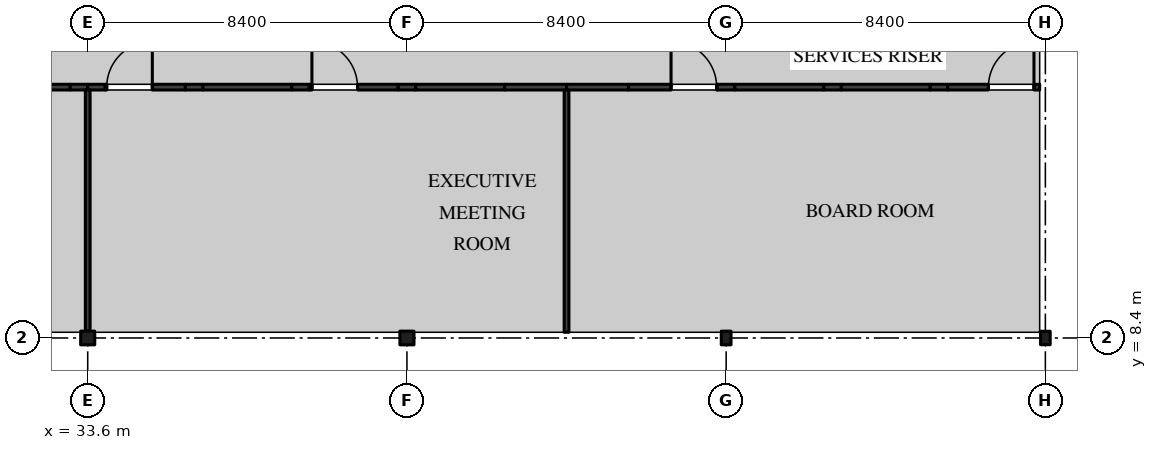
"""IFC4 building model, lengths in metres.
Left out: names, types, materials, properties, quantities, classifications, styles, units other than length and angle.
Written with IfcOpenShell. Run it as: python <this file> out.ifc"""

import sys

from ifc_helpers import new_model, si_unit, direction, frame, frame_2d, origin, origin_2d, place, context, subcontext, project, spatial, rectangle, i_section, extrude, element, fill, save


model = new_model("IFC4")
c1 = context("Model", 3, precision=1e-05, world=origin(), true_north=direction((0.0, 1.0)))
c2 = subcontext(c1, "Body", "Model", "MODEL_VIEW")
j1 = project(units=[si_unit("LENGTHUNIT", "METRE"), si_unit("PLANEANGLEUNIT", "RADIAN")], contexts=[c1])
p1 = place(None, origin())
s1 = spatial("IfcSite", under=j1, at=p1, CompositionType="ELEMENT")
p2 = place(p1, origin())
s2 = spatial("IfcBuilding", under=s1, at=p2, CompositionType="ELEMENT")
p3 = place(p2, frame((0.0, 0.0, 9.9)))
s3 = spatial("IfcBuildingStorey", under=s2, at=p3, CompositionType="ELEMENT", Elevation=9.9)
for number, where, z_axis, x_axis in (
    (1, (33.6, 8.4, 0.0), (0.0, 0.0, 1.0), (1.0, 0.0, 0.0)),
    (2, (42.0, 8.4, 0.0), (0.0, 0.0, 1.0), (1.0, 0.0, 0.0)),
):
    element("IfcColumn", number, at=place(p3, frame(where, z_axis=z_axis, x_axis=x_axis)), inside=s3, PredefinedType="COLUMN", context=c2, shape_type="SweptSolid", body=[
        extrude(i_section(OverallWidth=0.371, OverallDepth=0.361, WebThickness=0.012, FlangeThickness=0.02, FilletRadius=0.015, at=origin_2d()), origin(), (0.0, 0.0, 1.0), 4.37),
    ])
p4 = place(p3, frame((50.4, 8.4, 0.0), z_axis=(0.0, 0.0, 1.0), x_axis=(1.0, 0.0, 0.0)))
e3 = element("IfcColumn", 3, at=p4, inside=s3, PredefinedType="COLUMN", context=c2, shape_type="SweptSolid", body=[
    extrude(i_section(OverallWidth=0.257, OverallDepth=0.361, WebThickness=0.011, FlangeThickness=0.02, FilletRadius=0.015, at=origin_2d()), origin(), (0.0, 0.0, 1.0), 4.37),
])
p5 = place(p3, frame((58.8, 8.4, 0.0), z_axis=(0.0, 0.0, 1.0), x_axis=(1.0, 0.0, 0.0)))
e4 = element("IfcColumn", 4, at=p5, inside=s3, PredefinedType="COLUMN", context=c2, shape_type="SweptSolid", body=[
    extrude(i_section(OverallWidth=0.254, OverallDepth=0.353, WebThickness=0.01, FlangeThickness=0.016, FilletRadius=0.015, at=origin_2d()), origin(), (0.0, 0.0, 1.0), 4.37),
])
p6 = place(p3, frame((31.03, 15.0, 0.0), z_axis=(0.0, 0.0, 1.0), x_axis=(1.0, 0.0, 0.0)))
e5 = element("IfcWall", 5, at=p6, inside=s3, PredefinedType="PARTITIONING", context=c2, shape_type="SweptSolid", body=[
    extrude(rectangle(XDim=2.11, YDim=0.15, at=frame_2d((1.055, 0.0))), origin(), (0.0, 0.0, 1.0), 4.37),
])
p7 = place(p3, frame((33.14, 15.0, 0.0), z_axis=(0.0, 0.0, 1.0), x_axis=(1.0, 0.0, 0.0)))
e6 = element("IfcWall", 6, at=p7, inside=s3, PredefinedType="PARTITIONING", context=c2, shape_type="SweptSolid", body=[
    extrude(rectangle(XDim=0.46, YDim=0.15, at=frame_2d((0.23, 0.0))), origin(), (0.0, 0.0, 1.0), 3.746),
])
p8 = place(p3, frame((33.6, 15.0, 0.0), z_axis=(0.0, 0.0, 1.0), x_axis=(1.0, 0.0, 0.0)))
e7 = element("IfcWall", 7, at=p8, inside=s3, PredefinedType="PARTITIONING", context=c2, shape_type="SweptSolid", body=[
    extrude(rectangle(XDim=0.46, YDim=0.15, at=frame_2d((0.23, 0.0))), origin(), (0.0, 0.0, 1.0), 3.746),
])
p9 = place(p3, frame((34.06, 15.0, 0.0), z_axis=(0.0, 0.0, 1.0), x_axis=(1.0, 0.0, 0.0)))
e8 = element("IfcWall", 8, at=p9, inside=s3, PredefinedType="PARTITIONING", context=c2, shape_type="SweptSolid", body=[
    extrude(rectangle(XDim=2.11, YDim=0.15, at=frame_2d((1.055, 0.0))), origin(), (0.0, 0.0, 1.0), 4.37),
])
p10 = place(p9, frame((0.04, 0.0, 0.0)))
e9 = element("IfcOpeningElement", 9, at=p10, cuts=e8, PredefinedType="OPENING", context=c2, shape_type="SweptSolid", body=[
    extrude(rectangle(XDim=1.2, YDim=2.4, at=frame_2d((0.6, 1.2))), frame((0.0, 0.085, 0.0), z_axis=(0.0, -1.0, 0.0), x_axis=(1.0, 0.0, 0.0)), (0.0, 0.0, 1.0), 0.17),
])
p11 = place(p3, frame((36.17, 15.0, 0.0), z_axis=(0.0, 0.0, 1.0), x_axis=(1.0, 0.0, 0.0)))
e10 = element("IfcWall", 10, at=p11, inside=s3, PredefinedType="PARTITIONING", context=c2, shape_type="SweptSolid", body=[
    extrude(rectangle(XDim=0.46, YDim=0.15, at=frame_2d((0.23, 0.0))), origin(), (0.0, 0.0, 1.0), 3.895),
])
p12 = place(p3, frame((36.63, 15.0, 0.0), z_axis=(0.0, 0.0, 1.0), x_axis=(1.0, 0.0, 0.0)))
e11 = element("IfcWall", 11, at=p12, inside=s3, PredefinedType="PARTITIONING", context=c2, shape_type="SweptSolid", body=[
    extrude(rectangle(XDim=2.34, YDim=0.15, at=frame_2d((1.17, 0.0))), origin(), (0.0, 0.0, 1.0), 4.37),
])
p13 = place(p3, frame((38.97, 15.0, 0.0), z_axis=(0.0, 0.0, 1.0), x_axis=(1.0, 0.0, 0.0)))
e12 = element("IfcWall", 12, at=p13, inside=s3, PredefinedType="PARTITIONING", context=c2, shape_type="SweptSolid", body=[
    extrude(rectangle(XDim=0.46, YDim=0.15, at=frame_2d((0.23, 0.0))), origin(), (0.0, 0.0, 1.0), 3.895),
])
p14 = place(p3, frame((39.43, 15.0, 0.0), z_axis=(0.0, 0.0, 1.0), x_axis=(1.0, 0.0, 0.0)))
e13 = element("IfcWall", 13, at=p14, inside=s3, PredefinedType="PARTITIONING", context=c2, shape_type="SweptSolid", body=[
    extrude(rectangle(XDim=2.34, YDim=0.15, at=frame_2d((1.17, 0.0))), origin(), (0.0, 0.0, 1.0), 4.37),
])
p15 = place(p14, frame((0.07, 0.0, 0.0)))
e14 = element("IfcOpeningElement", 14, at=p15, cuts=e13, PredefinedType="OPENING", context=c2, shape_type="SweptSolid", body=[
    extrude(rectangle(XDim=1.2, YDim=2.4, at=frame_2d((0.6, 1.2))), frame((0.0, 0.085, 0.0), z_axis=(0.0, -1.0, 0.0), x_axis=(1.0, 0.0, 0.0)), (0.0, 0.0, 1.0), 0.17),
])
p16 = place(p3, frame((41.77, 15.0, 0.0), z_axis=(0.0, 0.0, 1.0), x_axis=(1.0, 0.0, 0.0)))
e15 = element("IfcWall", 15, at=p16, inside=s3, PredefinedType="PARTITIONING", context=c2, shape_type="SweptSolid", body=[
    extrude(rectangle(XDim=0.46, YDim=0.15, at=frame_2d((0.23, 0.0))), origin(), (0.0, 0.0, 1.0), 3.746),
])
p17 = place(p3, frame((42.23, 15.0, 0.0), z_axis=(0.0, 0.0, 1.0), x_axis=(1.0, 0.0, 0.0)))
e16 = element("IfcWall", 16, at=p17, inside=s3, PredefinedType="PARTITIONING", context=c2, shape_type="SweptSolid", body=[
    extrude(rectangle(XDim=2.34, YDim=0.15, at=frame_2d((1.17, 0.0))), origin(), (0.0, 0.0, 1.0), 4.37),
])
p18 = place(p3, frame((44.57, 15.0, 0.0), z_axis=(0.0, 0.0, 1.0), x_axis=(1.0, 0.0, 0.0)))
e17 = element("IfcWall", 17, at=p18, inside=s3, PredefinedType="PARTITIONING", context=c2, shape_type="SweptSolid", body=[
    extrude(rectangle(XDim=1.63, YDim=0.15, at=frame_2d((0.815, 0.0))), origin(), (0.0, 0.0, 1.0), 3.895),
])
p19 = place(p3, frame((46.2, 15.0, 0.0), z_axis=(0.0, 0.0, 1.0), x_axis=(1.0, 0.0, 0.0)))
e18 = element("IfcWall", 18, at=p19, inside=s3, PredefinedType="PARTITIONING", context=c2, shape_type="SweptSolid", body=[
    extrude(rectangle(XDim=1.63, YDim=0.15, at=frame_2d((0.815, 0.0))), origin(), (0.0, 0.0, 1.0), 3.895),
])
p20 = place(p3, frame((47.83, 15.0, 0.0), z_axis=(0.0, 0.0, 1.0), x_axis=(1.0, 0.0, 0.0)))
e19 = element("IfcWall", 19, at=p20, inside=s3, PredefinedType="PARTITIONING", context=c2, shape_type="SweptSolid", body=[
    extrude(rectangle(XDim=2.34, YDim=0.15, at=frame_2d((1.17, 0.0))), origin(), (0.0, 0.0, 1.0), 4.37),
])
p21 = place(p20, frame((1.12, 0.0, 0.0)))
e20 = element("IfcOpeningElement", 20, at=p21, cuts=e19, PredefinedType="OPENING", context=c2, shape_type="SweptSolid", body=[
    extrude(rectangle(XDim=1.2, YDim=2.4, at=frame_2d((0.6, 1.2))), frame((0.0, 0.085, 0.0), z_axis=(0.0, -1.0, 0.0), x_axis=(1.0, 0.0, 0.0)), (0.0, 0.0, 1.0), 0.17),
])
p22 = place(p3, frame((50.17, 15.0, 0.0), z_axis=(0.0, 0.0, 1.0), x_axis=(1.0, 0.0, 0.0)))
e21 = element("IfcWall", 21, at=p22, inside=s3, PredefinedType="PARTITIONING", context=c2, shape_type="SweptSolid", body=[
    extrude(rectangle(XDim=0.46, YDim=0.15, at=frame_2d((0.23, 0.0))), origin(), (0.0, 0.0, 1.0), 3.746),
])
p23 = place(p3, frame((50.63, 15.0, 0.0), z_axis=(0.0, 0.0, 1.0), x_axis=(1.0, 0.0, 0.0)))
e22 = element("IfcWall", 22, at=p23, inside=s3, PredefinedType="PARTITIONING", context=c2, shape_type="SweptSolid", body=[
    extrude(rectangle(XDim=2.34, YDim=0.15, at=frame_2d((1.17, 0.0))), origin(), (0.0, 0.0, 1.0), 4.37),
])
p24 = place(p3, frame((52.97, 15.0, 0.0), z_axis=(0.0, 0.0, 1.0), x_axis=(1.0, 0.0, 0.0)))
e23 = element("IfcWall", 23, at=p24, inside=s3, PredefinedType="PARTITIONING", context=c2, shape_type="SweptSolid", body=[
    extrude(rectangle(XDim=0.46, YDim=0.15, at=frame_2d((0.23, 0.0))), origin(), (0.0, 0.0, 1.0), 3.895),
])
p25 = place(p3, frame((53.43, 15.0, 0.0), z_axis=(0.0, 0.0, 1.0), x_axis=(1.0, 0.0, 0.0)))
e24 = element("IfcWall", 24, at=p25, inside=s3, PredefinedType="PARTITIONING", context=c2, shape_type="SweptSolid", body=[
    extrude(rectangle(XDim=2.34, YDim=0.15, at=frame_2d((1.17, 0.0))), origin(), (0.0, 0.0, 1.0), 4.37),
])
p26 = place(p3, frame((55.77, 15.0, 0.0), z_axis=(0.0, 0.0, 1.0), x_axis=(1.0, 0.0, 0.0)))
e25 = element("IfcWall", 25, at=p26, inside=s3, PredefinedType="PARTITIONING", context=c2, shape_type="SweptSolid", body=[
    extrude(rectangle(XDim=0.46, YDim=0.15, at=frame_2d((0.23, 0.0))), origin(), (0.0, 0.0, 1.0), 3.895),
])
p27 = place(p3, frame((56.23, 15.0, 0.0), z_axis=(0.0, 0.0, 1.0), x_axis=(1.0, 0.0, 0.0)))
e26 = element("IfcWall", 26, at=p27, inside=s3, PredefinedType="PARTITIONING", context=c2, shape_type="SweptSolid", body=[
    extrude(rectangle(XDim=2.42, YDim=0.15, at=frame_2d((1.21, 0.0))), origin(), (0.0, 0.0, 1.0), 4.37),
])
p28 = place(p27, frame((1.07, 0.0, 0.0)))
e27 = element("IfcOpeningElement", 27, at=p28, cuts=e26, PredefinedType="OPENING", context=c2, shape_type="SweptSolid", body=[
    extrude(rectangle(XDim=1.2, YDim=2.4, at=frame_2d((0.6, 1.2))), frame((0.0, 0.085, 0.0), z_axis=(0.0, -1.0, 0.0), x_axis=(1.0, 0.0, 0.0)), (0.0, 0.0, 1.0), 0.17),
])
p29 = place(p3, frame((33.6, 8.581, 0.0), z_axis=(0.0, 0.0, 1.0), x_axis=(0.0, 1.0, 0.0)))
e28 = element("IfcWall", 28, at=p29, inside=s3, PredefinedType="PARTITIONING", context=c2, shape_type="SweptSolid", body=[
    extrude(rectangle(XDim=6.344, YDim=0.125, at=frame_2d((3.172, 0.0))), origin(), (0.0, 0.0, 1.0), 3.746),
])
p30 = place(p3, frame((46.2, 8.55, 0.0), z_axis=(0.0, 0.0, 1.0), x_axis=(0.0, 1.0, 0.0)))
e29 = element("IfcWall", 29, at=p30, inside=s3, PredefinedType="PARTITIONING", context=c2, shape_type="SweptSolid", body=[
    extrude(rectangle(XDim=6.375, YDim=0.125, at=frame_2d((3.188, 0.0))), origin(), (0.0, 0.0, 1.0), 4.37),
])
p31 = place(p10, origin())
e30 = element("IfcDoor", 30, at=p31, inside=s3, OperationType="SINGLE_SWING_LEFT", PredefinedType="DOOR", context=c2, shape_type="SweptSolid", body=[
    extrude(rectangle(XDim=1.2, YDim=2.4, at=frame_2d((0.6, 1.2))), frame((0.0, 0.025, 0.0), z_axis=(0.0, -1.0, 0.0), x_axis=(1.0, 0.0, 0.0)), (0.0, 0.0, 1.0), 0.05),
])
fill(e9, e30)
p32 = place(p15, origin())
e31 = element("IfcDoor", 31, at=p32, inside=s3, OperationType="SINGLE_SWING_RIGHT", PredefinedType="DOOR", context=c2, shape_type="SweptSolid", body=[
    extrude(rectangle(XDim=1.2, YDim=2.4, at=frame_2d((0.6, 1.2))), frame((0.0, 0.025, 0.0), z_axis=(0.0, -1.0, 0.0), x_axis=(1.0, 0.0, 0.0)), (0.0, 0.0, 1.0), 0.05),
])
fill(e14, e31)
p33 = place(p21, origin())
e32 = element("IfcDoor", 32, at=p33, inside=s3, OperationType="SINGLE_SWING_RIGHT", PredefinedType="DOOR", context=c2, shape_type="SweptSolid", body=[
    extrude(rectangle(XDim=1.2, YDim=2.4, at=frame_2d((0.6, 1.2))), frame((0.0, 0.025, 0.0), z_axis=(0.0, -1.0, 0.0), x_axis=(1.0, 0.0, 0.0)), (0.0, 0.0, 1.0), 0.05),
])
fill(e20, e32)
p34 = place(p28, origin())
e33 = element("IfcDoor", 33, at=p34, inside=s3, OperationType="SINGLE_SWING_LEFT", PredefinedType="DOOR", context=c2, shape_type="SweptSolid", body=[
    extrude(rectangle(XDim=1.2, YDim=2.4, at=frame_2d((0.6, 1.2))), frame((0.0, 0.025, 0.0), z_axis=(0.0, -1.0, 0.0), x_axis=(1.0, 0.0, 0.0)), (0.0, 0.0, 1.0), 0.05),
])
fill(e27, e33)
save(model, sys.argv[1])
